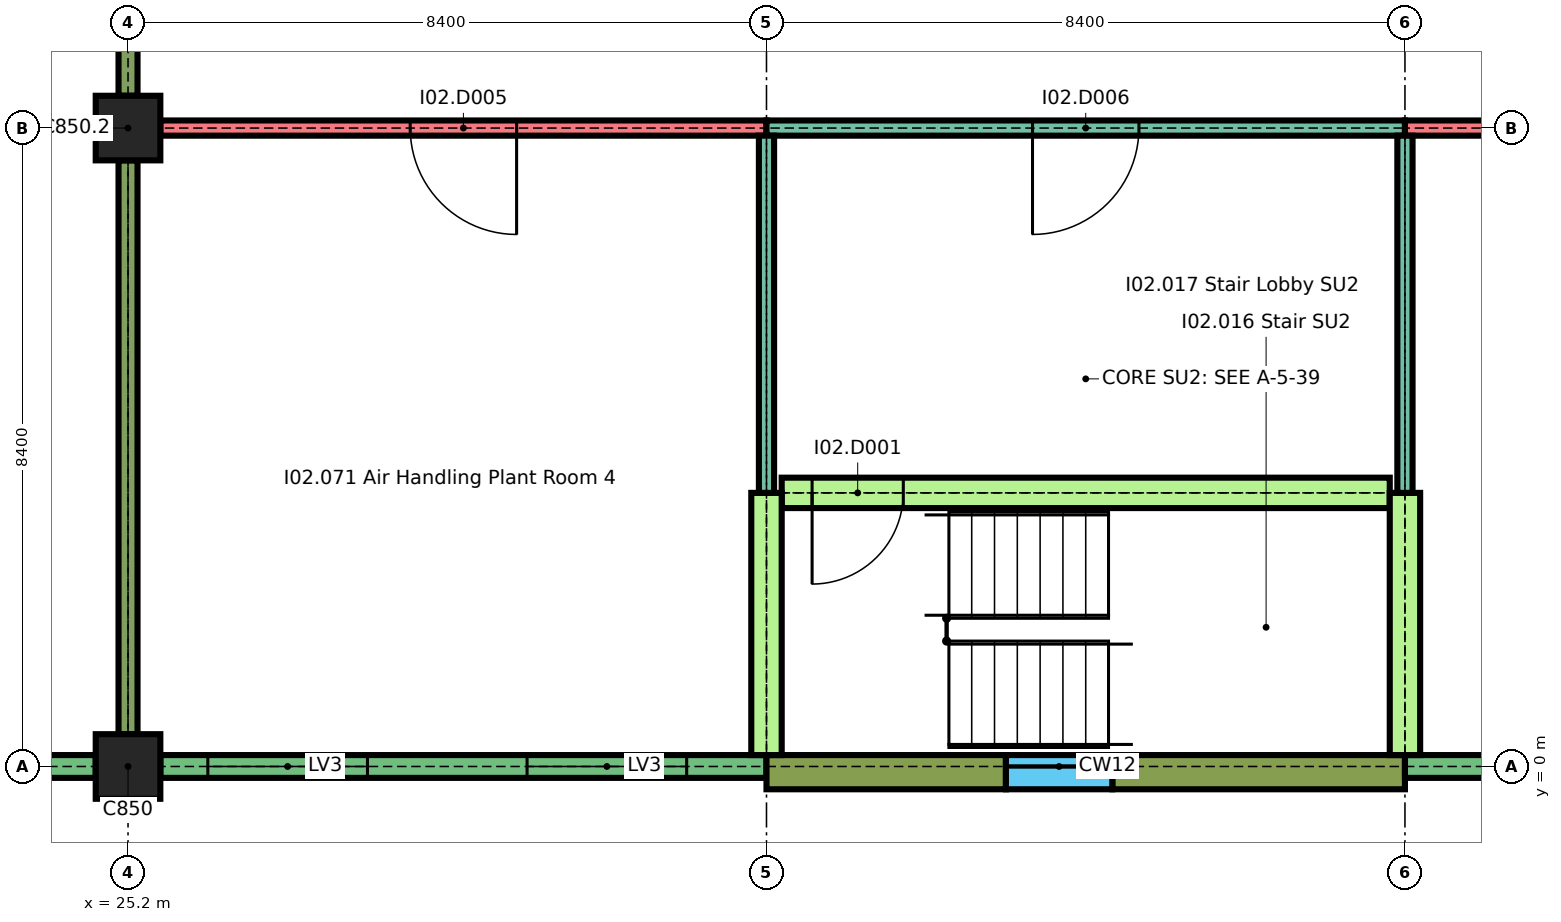
"""IFC4 building model, lengths in metres.
Left out: names, types, materials, properties, quantities, classifications, styles, units other than length and angle.
Written with IfcOpenShell. Run it as: python <this file> out.ifc"""

import sys

from ifc_helpers import new_model, si_unit, direction, frame, frame_2d, origin, origin_2d, place, context, subcontext, project, spatial, rectangle, extrude, element, fill, save


model = new_model("IFC4")
c1 = context("Model", 3, precision=1e-05, world=origin(), true_north=direction((0.0, 1.0)))
c2 = subcontext(c1, "Body", "Model", "MODEL_VIEW")
j1 = project(units=[si_unit("LENGTHUNIT", "METRE"), si_unit("PLANEANGLEUNIT", "RADIAN")], contexts=[c1])
p1 = place(None, origin())
s1 = spatial("IfcSite", under=j1, at=p1, CompositionType="ELEMENT")
p2 = place(p1, origin())
s2 = spatial("IfcBuilding", under=s1, at=p2, CompositionType="ELEMENT")
p3 = place(p2, frame((0.0, 0.0, 12.9)))
s3 = spatial("IfcBuildingStorey", under=s2, at=p3, CompositionType="ELEMENT", Elevation=12.9)
for number, where, z_axis, x_axis in (
    (1, (25.2, 0.0, 0.0), (0.0, 0.0, 1.0), (1.0, 0.0, 0.0)),
    (2, (25.2, 8.4, 0.0), (0.0, 0.0, 1.0), (1.0, 0.0, 0.0)),
):
    element("IfcColumn", number, at=place(p3, frame(where, z_axis=z_axis, x_axis=x_axis)), inside=s3, PredefinedType="COLUMN", context=c2, shape_type="SweptSolid", body=[
        extrude(rectangle(XDim=0.85, YDim=0.85, at=origin_2d()), origin(), (0.0, 0.0, 1.0), 2.04),
    ])
p4 = place(p3, frame((17.225, 0.0, 0.0), z_axis=(0.0, 0.0, 1.0), x_axis=(1.0, 0.0, 0.0)))
e3 = element("IfcWall", 3, at=p4, inside=s3, PredefinedType="SOLIDWALL", context=c2, shape_type="SweptSolid", body=[
    extrude(rectangle(XDim=7.55, YDim=0.3, at=frame_2d((3.775, 0.0))), origin(), (0.0, 0.0, 1.0), 1.74),
])
p5 = place(p4, frame((0.625, 0.0, 0.6)))
e4 = element("IfcOpeningElement", 4, at=p5, cuts=e3, PredefinedType="OPENING", context=c2, shape_type="SweptSolid", body=[
    extrude(rectangle(XDim=2.1, YDim=1.05, at=frame_2d((1.05, 0.525))), frame((0.0, 0.16, 0.0), z_axis=(0.0, -1.0, 0.0), x_axis=(1.0, 0.0, 0.0)), (0.0, 0.0, 1.0), 0.32),
])
p6 = place(p4, frame((4.825, 0.0, 0.6)))
e5 = element("IfcOpeningElement", 5, at=p6, cuts=e3, PredefinedType="OPENING", context=c2, shape_type="SweptSolid", body=[
    extrude(rectangle(XDim=2.1, YDim=1.05, at=frame_2d((1.05, 0.525))), frame((0.0, 0.16, 0.0), z_axis=(0.0, -1.0, 0.0), x_axis=(1.0, 0.0, 0.0)), (0.0, 0.0, 1.0), 0.32),
])
p7 = place(p3, frame((25.625, 0.0, 0.0), z_axis=(0.0, 0.0, 1.0), x_axis=(1.0, 0.0, 0.0)))
e6 = element("IfcWall", 6, at=p7, inside=s3, PredefinedType="SOLIDWALL", context=c2, shape_type="SweptSolid", body=[
    extrude(rectangle(XDim=7.975, YDim=0.3, at=frame_2d((3.988, 0.0))), origin(), (0.0, 0.0, 1.0), 1.74),
])
p8 = place(p7, frame((0.625, 0.0, 0.6)))
e7 = element("IfcOpeningElement", 7, at=p8, cuts=e6, PredefinedType="OPENING", context=c2, shape_type="SweptSolid", body=[
    extrude(rectangle(XDim=2.1, YDim=1.05, at=frame_2d((1.05, 0.525))), frame((0.0, 0.16, 0.0), z_axis=(0.0, -1.0, 0.0), x_axis=(1.0, 0.0, 0.0)), (0.0, 0.0, 1.0), 0.32),
])
p9 = place(p7, frame((4.825, 0.0, 0.6)))
e8 = element("IfcOpeningElement", 8, at=p9, cuts=e6, PredefinedType="OPENING", context=c2, shape_type="SweptSolid", body=[
    extrude(rectangle(XDim=2.1, YDim=1.05, at=frame_2d((1.05, 0.525))), frame((0.0, 0.16, 0.0), z_axis=(0.0, -1.0, 0.0), x_axis=(1.0, 0.0, 0.0)), (0.0, 0.0, 1.0), 0.32),
])
p10 = place(p3, frame((33.6, -0.075, 0.0), z_axis=(0.0, 0.0, 1.0), x_axis=(1.0, 0.0, 0.0)))
e9 = element("IfcWall", 9, at=p10, inside=s3, PredefinedType="SOLIDWALL", context=c2, shape_type="SweptSolid", body=[
    extrude(rectangle(XDim=3.15, YDim=0.45, at=frame_2d((1.575, 0.0))), origin(), (0.0, 0.0, 1.0), 2.04),
])
p11 = place(p3, frame((38.15, -0.075, 0.0), z_axis=(0.0, 0.0, 1.0), x_axis=(1.0, 0.0, 0.0)))
e10 = element("IfcWall", 10, at=p11, inside=s3, PredefinedType="SOLIDWALL", context=c2, shape_type="SweptSolid", body=[
    extrude(rectangle(XDim=3.85, YDim=0.45, at=frame_2d((1.925, 0.0))), origin(), (0.0, 0.0, 1.0), 2.04),
])
p12 = place(p3, frame((36.75, -0.075, 0.0), z_axis=(0.0, 0.0, 1.0), x_axis=(1.0, 0.0, 0.0)))
e11 = element("IfcWall", 11, at=p12, inside=s3, PredefinedType="SOLIDWALL", context=c2, shape_type="SweptSolid", body=[
    extrude(rectangle(XDim=1.4, YDim=0.45, at=frame_2d((0.7, 0.0))), origin(), (0.0, 0.0, 1.0), 0.6),
])
p13 = place(p3, frame((42.0, 0.0, 0.0), z_axis=(0.0, 0.0, 1.0), x_axis=(1.0, 0.0, 0.0)))
e12 = element("IfcWall", 12, at=p13, inside=s3, PredefinedType="SOLIDWALL", context=c2, shape_type="SweptSolid", body=[
    extrude(rectangle(XDim=7.95, YDim=0.3, at=frame_2d((3.975, 0.0))), origin(), (0.0, 0.0, 1.0), 1.74),
])
p14 = place(p13, frame((1.05, 0.0, 0.6)))
e13 = element("IfcOpeningElement", 13, at=p14, cuts=e12, PredefinedType="OPENING", context=c2, shape_type="SweptSolid", body=[
    extrude(rectangle(XDim=2.1, YDim=1.05, at=frame_2d((1.05, 0.525))), frame((0.0, 0.16, 0.0), z_axis=(0.0, -1.0, 0.0), x_axis=(1.0, 0.0, 0.0)), (0.0, 0.0, 1.0), 0.32),
])
p15 = place(p13, frame((5.25, 0.0, 0.6)))
e14 = element("IfcOpeningElement", 14, at=p15, cuts=e12, PredefinedType="OPENING", context=c2, shape_type="SweptSolid", body=[
    extrude(rectangle(XDim=2.1, YDim=1.05, at=frame_2d((1.05, 0.525))), frame((0.0, 0.16, 0.0), z_axis=(0.0, -1.0, 0.0), x_axis=(1.0, 0.0, 0.0)), (0.0, 0.0, 1.0), 0.32),
])
p16 = place(p3, frame((33.8, 3.6, 0.0), z_axis=(0.0, 0.0, 1.0), x_axis=(1.0, 0.0, 0.0)))
e15 = element("IfcWall", 15, at=p16, inside=s3, PredefinedType="SHEAR", context=c2, shape_type="SweptSolid", body=[
    extrude(rectangle(XDim=8.0, YDim=0.4, at=frame_2d((4.0, 0.0))), origin(), (0.0, 0.0, 1.0), 2.04),
])
p17 = place(p16, frame((0.4, 0.0, 0.0)))
e16 = element("IfcOpeningElement", 16, at=p17, cuts=e15, PredefinedType="OPENING", context=c2, shape_type="SweptSolid", body=[
    extrude(rectangle(XDim=1.2, YDim=2.0, at=frame_2d((0.6, 1.0))), frame((0.0, 0.21, 0.0), z_axis=(0.0, -1.0, 0.0), x_axis=(1.0, 0.0, 0.0)), (0.0, 0.0, 1.0), 0.42),
])
p18 = place(p3, frame((25.625, 8.4, 0.0), z_axis=(0.0, 0.0, 1.0), x_axis=(1.0, 0.0, 0.0)))
e17 = element("IfcWall", 17, at=p18, inside=s3, PredefinedType="SOLIDWALL", context=c2, shape_type="SweptSolid", body=[
    extrude(rectangle(XDim=7.975, YDim=0.2, at=frame_2d((3.988, 0.0))), origin(), (0.0, 0.0, 1.0), 2.04),
])
p19 = place(p18, frame((3.288, 0.0, 0.0)))
e18 = element("IfcOpeningElement", 18, at=p19, cuts=e17, PredefinedType="OPENING", context=c2, shape_type="SweptSolid", body=[
    extrude(rectangle(XDim=1.4, YDim=2.0, at=frame_2d((0.7, 1.0))), frame((0.0, 0.11, 0.0), z_axis=(0.0, -1.0, 0.0), x_axis=(1.0, 0.0, 0.0)), (0.0, 0.0, 1.0), 0.22),
])
p20 = place(p3, frame((33.6, 8.4, 0.0), z_axis=(0.0, 0.0, 1.0), x_axis=(1.0, 0.0, 0.0)))
e19 = element("IfcWall", 19, at=p20, inside=s3, PredefinedType="PARTITIONING", context=c2, shape_type="SweptSolid", body=[
    extrude(rectangle(XDim=8.4, YDim=0.2, at=frame_2d((4.2, 0.0))), origin(), (0.0, 0.0, 1.0), 2.04),
])
p21 = place(p20, frame((3.5, 0.0, 0.0)))
e20 = element("IfcOpeningElement", 20, at=p21, cuts=e19, PredefinedType="OPENING", context=c2, shape_type="SweptSolid", body=[
    extrude(rectangle(XDim=1.4, YDim=2.0, at=frame_2d((0.7, 1.0))), frame((0.0, 0.11, 0.0), z_axis=(0.0, -1.0, 0.0), x_axis=(1.0, 0.0, 0.0)), (0.0, 0.0, 1.0), 0.22),
])
p22 = place(p3, frame((42.0, 8.4, 0.0), z_axis=(0.0, 0.0, 1.0), x_axis=(1.0, 0.0, 0.0)))
e21 = element("IfcWall", 21, at=p22, inside=s3, PredefinedType="SOLIDWALL", context=c2, shape_type="SweptSolid", body=[
    extrude(rectangle(XDim=7.95, YDim=0.2, at=frame_2d((3.975, 0.0))), origin(), (0.0, 0.0, 1.0), 2.04),
])
p23 = place(p22, frame((3.275, 0.0, 0.0)))
e22 = element("IfcOpeningElement", 22, at=p23, cuts=e21, PredefinedType="OPENING", context=c2, shape_type="SweptSolid", body=[
    extrude(rectangle(XDim=1.4, YDim=2.0, at=frame_2d((0.7, 1.0))), frame((0.0, 0.11, 0.0), z_axis=(0.0, -1.0, 0.0), x_axis=(1.0, 0.0, 0.0)), (0.0, 0.0, 1.0), 0.22),
])
p24 = place(p3, frame((25.2, 0.425, 0.0), z_axis=(0.0, 0.0, 1.0), x_axis=(0.0, 1.0, 0.0)))
e23 = element("IfcWall", 23, at=p24, inside=s3, PredefinedType="SOLIDWALL", context=c2, shape_type="SweptSolid", body=[
    extrude(rectangle(XDim=7.55, YDim=0.25, at=frame_2d((3.775, 0.0))), origin(), (0.0, 0.0, 1.0), 2.04),
])
p25 = place(p3, frame((25.2, 8.825, 0.0), z_axis=(0.0, 0.0, 1.0), x_axis=(0.0, 1.0, 0.0)))
e24 = element("IfcWall", 24, at=p25, inside=s3, PredefinedType="SOLIDWALL", context=c2, shape_type="SweptSolid", body=[
    extrude(rectangle(XDim=12.775, YDim=0.25, at=frame_2d((6.388, 0.0))), origin(), (0.0, 0.0, 1.0), 2.04),
])
p26 = place(p25, frame((9.475, 0.0, 0.0)))
e25 = element("IfcOpeningElement", 25, at=p26, cuts=e24, PredefinedType="OPENING", context=c2, shape_type="SweptSolid", body=[
    extrude(rectangle(XDim=1.8, YDim=2.0, at=frame_2d((0.9, 1.0))), frame((0.0, 0.135, 0.0), z_axis=(0.0, -1.0, 0.0), x_axis=(1.0, 0.0, 0.0)), (0.0, 0.0, 1.0), 0.27),
])
p27 = place(p3, frame((33.6, 0.15, 0.0), z_axis=(0.0, 0.0, 1.0), x_axis=(0.0, 1.0, 0.0)))
e26 = element("IfcWall", 26, at=p27, inside=s3, PredefinedType="SHEAR", context=c2, shape_type="SweptSolid", body=[
    extrude(rectangle(XDim=3.45, YDim=0.4, at=frame_2d((1.725, 0.0))), origin(), (0.0, 0.0, 1.0), 2.04),
])
p28 = place(p3, frame((33.6, 3.6, 0.0), z_axis=(0.0, 0.0, 1.0), x_axis=(0.0, 1.0, 0.0)))
e27 = element("IfcWall", 27, at=p28, inside=s3, PredefinedType="PARTITIONING", context=c2, shape_type="SweptSolid", body=[
    extrude(rectangle(XDim=4.7, YDim=0.2, at=frame_2d((2.35, 0.0))), origin(), (0.0, 0.0, 1.0), 2.04),
])
p29 = place(p3, frame((42.0, 0.15, 0.0), z_axis=(0.0, 0.0, 1.0), x_axis=(0.0, 1.0, 0.0)))
e28 = element("IfcWall", 28, at=p29, inside=s3, PredefinedType="SHEAR", context=c2, shape_type="SweptSolid", body=[
    extrude(rectangle(XDim=3.45, YDim=0.4, at=frame_2d((1.725, 0.0))), origin(), (0.0, 0.0, 1.0), 2.04),
])
p30 = place(p3, frame((42.0, 3.6, 0.0), z_axis=(0.0, 0.0, 1.0), x_axis=(0.0, 1.0, 0.0)))
e29 = element("IfcWall", 29, at=p30, inside=s3, PredefinedType="PARTITIONING", context=c2, shape_type="SweptSolid", body=[
    extrude(rectangle(XDim=4.7, YDim=0.2, at=frame_2d((2.35, 0.0))), origin(), (0.0, 0.0, 1.0), 2.04),
])
p31 = place(p8, origin())
e30 = element("IfcWindow", 30, at=p31, inside=s3, PartitioningType="SINGLE_PANEL", PredefinedType="WINDOW", context=c2, shape_type="SweptSolid", body=[
    extrude(rectangle(XDim=2.1, YDim=1.05, at=frame_2d((1.05, 0.525))), frame((0.0, 0.075, 0.0), z_axis=(0.0, -1.0, 0.0), x_axis=(1.0, 0.0, 0.0)), (0.0, 0.0, 1.0), 0.15),
])
fill(e7, e30)
p32 = place(p9, origin())
e31 = element("IfcWindow", 31, at=p32, inside=s3, PartitioningType="SINGLE_PANEL", PredefinedType="WINDOW", context=c2, shape_type="SweptSolid", body=[
    extrude(rectangle(XDim=2.1, YDim=1.05, at=frame_2d((1.05, 0.525))), frame((0.0, 0.075, 0.0), z_axis=(0.0, -1.0, 0.0), x_axis=(1.0, 0.0, 0.0)), (0.0, 0.0, 1.0), 0.15),
])
fill(e8, e31)
p33 = place(p17, origin())
e32 = element("IfcDoor", 32, at=p33, inside=s3, OperationType="SINGLE_SWING_LEFT", PredefinedType="DOOR", context=c2, shape_type="SweptSolid", body=[
    extrude(rectangle(XDim=1.2, YDim=2.0, at=frame_2d((0.6, 1.0))), frame((0.0, 0.025, 0.0), z_axis=(0.0, -1.0, 0.0), x_axis=(1.0, 0.0, 0.0)), (0.0, 0.0, 1.0), 0.05),
])
fill(e16, e32)
p34 = place(p19, origin())
e33 = element("IfcDoor", 33, at=p34, inside=s3, OperationType="SINGLE_SWING_RIGHT", PredefinedType="DOOR", context=c2, shape_type="SweptSolid", body=[
    extrude(rectangle(XDim=1.4, YDim=2.0, at=frame_2d((0.7, 1.0))), frame((0.0, 0.025, 0.0), z_axis=(0.0, -1.0, 0.0), x_axis=(1.0, 0.0, 0.0)), (0.0, 0.0, 1.0), 0.05),
])
fill(e18, e33)
p35 = place(p21, origin())
e34 = element("IfcDoor", 34, at=p35, inside=s3, OperationType="SINGLE_SWING_LEFT", PredefinedType="DOOR", context=c2, shape_type="SweptSolid", body=[
    extrude(rectangle(XDim=1.4, YDim=2.0, at=frame_2d((0.7, 1.0))), frame((0.0, 0.03, 0.0), z_axis=(0.0, -1.0, 0.0), x_axis=(1.0, 0.0, 0.0)), (0.0, 0.0, 1.0), 0.06),
])
fill(e20, e34)
save(model, sys.argv[1])
